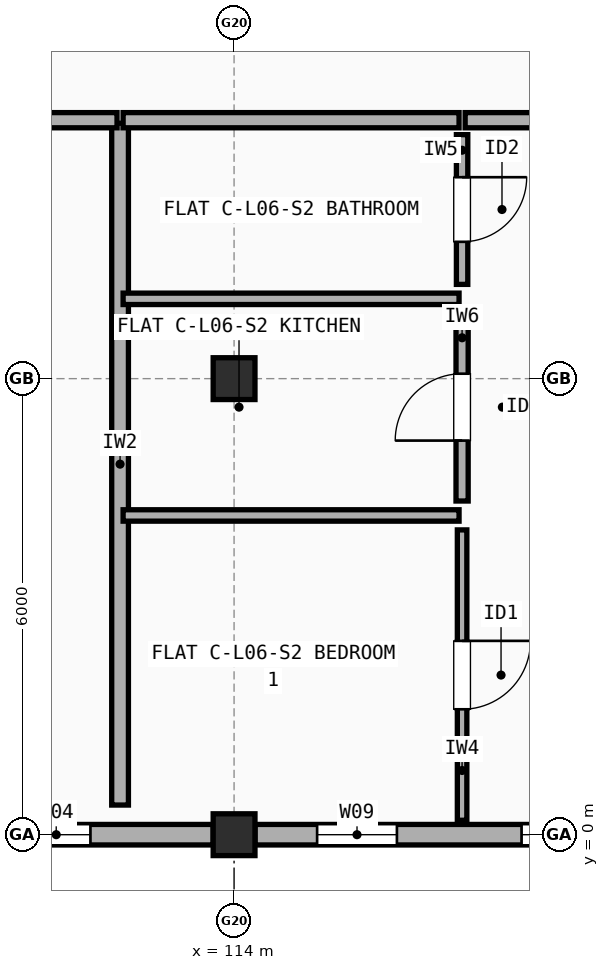
"""IFC4 building model, lengths in metres.
Left out: names, types, materials, properties, quantities, classifications, styles, units other than length and angle.
Written with IfcOpenShell. Run it as: python <this file> out.ifc"""

import sys

from ifc_helpers import new_model, si_unit, direction, frame, frame_2d, origin, origin_2d, place, context, subcontext, project, spatial, rectangle, extrude, element, fill, save


model = new_model("IFC4")
c1 = context("Model", 3, precision=1e-05, world=origin(), true_north=direction((0.0, 1.0)))
c2 = subcontext(c1, "Body", "Model", "MODEL_VIEW")
j1 = project(units=[si_unit("LENGTHUNIT", "METRE"), si_unit("PLANEANGLEUNIT", "RADIAN")], contexts=[c1])
p1 = place(None, origin())
s1 = spatial("IfcSite", under=j1, at=p1, CompositionType="ELEMENT")
p2 = place(p1, origin())
s2 = spatial("IfcBuilding", under=s1, at=p2, CompositionType="ELEMENT")
p3 = place(p2, frame((0.0, 0.0, 20.5)))
s3 = spatial("IfcBuildingStorey", under=s2, at=p3, CompositionType="ELEMENT", Elevation=20.5)
for number, where, z_axis, x_axis in (
    (1, (114.0, 0.0, 0.0), (0.0, 0.0, 1.0), (1.0, 0.0, 0.0)),
    (2, (114.0, 6.0, 0.0), (0.0, 0.0, 1.0), (1.0, 0.0, 0.0)),
):
    element("IfcColumn", number, at=place(p3, frame(where, z_axis=z_axis, x_axis=x_axis)), inside=s3, PredefinedType="COLUMN", context=c2, shape_type="SweptSolid", body=[
        extrude(rectangle(XDim=0.55, YDim=0.55, at=origin_2d()), origin(), (0.0, 0.0, 1.0), 2.97),
    ])
p4 = place(p3, frame((108.275, 0.0, 0.0), z_axis=(0.0, 0.0, 1.0), x_axis=(1.0, 0.0, 0.0)))
e3 = element("IfcWall", 3, at=p4, inside=s3, PredefinedType="STANDARD", context=c2, shape_type="SweptSolid", body=[
    extrude(rectangle(XDim=5.45, YDim=0.27, at=frame_2d((2.725, 0.0))), origin(), (0.0, 0.0, 1.0), 2.452),
])
p5 = place(p4, frame((0.35, 0.0, 0.9)))
e4 = element("IfcOpeningElement", 4, at=p5, cuts=e3, PredefinedType="OPENING", context=c2, shape_type="SweptSolid", body=[
    extrude(rectangle(XDim=0.9, YDim=1.3, at=frame_2d((0.45, 0.65))), frame((0.0, 0.145, 0.0), z_axis=(0.0, -1.0, 0.0), x_axis=(1.0, 0.0, 0.0)), (0.0, 0.0, 1.0), 0.29),
])
p6 = place(p4, frame((2.935, 0.0, 0.9)))
e5 = element("IfcOpeningElement", 5, at=p6, cuts=e3, PredefinedType="OPENING", context=c2, shape_type="SweptSolid", body=[
    extrude(rectangle(XDim=0.9, YDim=1.3, at=frame_2d((0.45, 0.65))), frame((0.0, 0.145, 0.0), z_axis=(0.0, -1.0, 0.0), x_axis=(1.0, 0.0, 0.0)), (0.0, 0.0, 1.0), 0.29),
])
p7 = place(p3, frame((114.275, 0.0, 0.0), z_axis=(0.0, 0.0, 1.0), x_axis=(1.0, 0.0, 0.0)))
e6 = element("IfcWall", 6, at=p7, inside=s3, PredefinedType="STANDARD", context=c2, shape_type="SweptSolid", body=[
    extrude(rectangle(XDim=5.45, YDim=0.27, at=frame_2d((2.725, 0.0))), origin(), (0.0, 0.0, 1.0), 2.452),
])
p8 = place(p7, frame((0.817, 0.0, 0.9)))
e7 = element("IfcOpeningElement", 7, at=p8, cuts=e6, PredefinedType="OPENING", context=c2, shape_type="SweptSolid", body=[
    extrude(rectangle(XDim=1.05, YDim=1.35, at=frame_2d((0.525, 0.675))), frame((0.0, 0.145, 0.0), z_axis=(0.0, -1.0, 0.0), x_axis=(1.0, 0.0, 0.0)), (0.0, 0.0, 1.0), 0.29),
])
p9 = place(p7, frame((3.508, 0.0, 0.9)))
e8 = element("IfcOpeningElement", 8, at=p9, cuts=e6, PredefinedType="OPENING", context=c2, shape_type="SweptSolid", body=[
    extrude(rectangle(XDim=1.2, YDim=1.35, at=frame_2d((0.6, 0.675))), frame((0.0, 0.145, 0.0), z_axis=(0.0, -1.0, 0.0), x_axis=(1.0, 0.0, 0.0)), (0.0, 0.0, 1.0), 0.29),
])
p10 = place(p3, frame((112.5, 0.39, 0.0), z_axis=(0.0, 0.0, 1.0), x_axis=(0.0, 1.0, 0.0)))
e9 = element("IfcWall", 9, at=p10, inside=s3, PredefinedType="SOLIDWALL", context=c2, shape_type="SweptSolid", body=[
    extrude(rectangle(XDim=8.97, YDim=0.22, at=frame_2d((4.485, 0.0))), origin(), (0.0, 0.0, 1.0), 2.452),
])
p11 = place(p3, frame((106.54, 9.4, 0.0), z_axis=(0.0, 0.0, 1.0), x_axis=(1.0, 0.0, 0.0)))
e10 = element("IfcWall", 10, at=p11, inside=s3, PredefinedType="SOLIDWALL", context=c2, shape_type="SweptSolid", body=[
    extrude(rectangle(XDim=5.92, YDim=0.2, at=frame_2d((2.96, 0.0))), origin(), (0.0, 0.0, 1.0), 2.548),
])
p12 = place(p11, frame((2.46, 0.0, 0.0)))
e11 = element("IfcOpeningElement", 11, at=p12, cuts=e10, PredefinedType="OPENING", context=c2, shape_type="SweptSolid", body=[
    extrude(rectangle(XDim=1.0, YDim=2.15, at=frame_2d((0.5, 1.075))), frame((0.0, 0.11, 0.0), z_axis=(0.0, -1.0, 0.0), x_axis=(1.0, 0.0, 0.0)), (0.0, 0.0, 1.0), 0.22),
])
p13 = place(p3, frame((112.54, 9.4, 0.0), z_axis=(0.0, 0.0, 1.0), x_axis=(1.0, 0.0, 0.0)))
e12 = element("IfcWall", 12, at=p13, inside=s3, PredefinedType="SOLIDWALL", context=c2, shape_type="SweptSolid", body=[
    extrude(rectangle(XDim=4.42, YDim=0.2, at=frame_2d((2.21, 0.0))), origin(), (0.0, 0.0, 1.0), 2.548),
])
p14 = place(p3, frame((117.04, 9.4, 0.0), z_axis=(0.0, 0.0, 1.0), x_axis=(1.0, 0.0, 0.0)))
e13 = element("IfcWall", 13, at=p14, inside=s3, PredefinedType="SOLIDWALL", context=c2, shape_type="SweptSolid", body=[
    extrude(rectangle(XDim=5.92, YDim=0.2, at=frame_2d((2.96, 0.0))), origin(), (0.0, 0.0, 1.0), 2.508),
])
p15 = place(p14, frame((2.47, 0.0, 0.0)))
e14 = element("IfcOpeningElement", 14, at=p15, cuts=e13, PredefinedType="OPENING", context=c2, shape_type="SweptSolid", body=[
    extrude(rectangle(XDim=0.98, YDim=2.15, at=frame_2d((0.49, 1.075))), frame((0.0, 0.11, 0.0), z_axis=(0.0, -1.0, 0.0), x_axis=(1.0, 0.0, 0.0)), (0.0, 0.0, 1.0), 0.22),
])
p16 = place(p3, frame((117.0, 0.19, 0.0), z_axis=(0.0, 0.0, 1.0), x_axis=(0.0, 1.0, 0.0)))
e15 = element("IfcWall", 15, at=p16, inside=s3, PredefinedType="PARTITIONING", context=c2, shape_type="SweptSolid", body=[
    extrude(rectangle(XDim=3.82, YDim=0.125, at=frame_2d((1.91, 0.0))), origin(), (0.0, 0.0, 1.0), 2.97),
])
p17 = place(p16, frame((1.46, 0.0, 0.0)))
e16 = element("IfcOpeningElement", 16, at=p17, cuts=e15, PredefinedType="OPENING", context=c2, shape_type="SweptSolid", body=[
    extrude(rectangle(XDim=0.9, YDim=2.1, at=frame_2d((0.45, 1.05))), frame((0.0, 0.073, 0.0), z_axis=(0.0, -1.0, 0.0), x_axis=(1.0, 0.0, 0.0)), (0.0, 0.0, 1.0), 0.145),
])
p18 = place(p3, frame((117.0, 4.39, 0.0), z_axis=(0.0, 0.0, 1.0), x_axis=(0.0, 1.0, 0.0)))
e17 = element("IfcWall", 17, at=p18, inside=s3, PredefinedType="PLUMBINGWALL", context=c2, shape_type="SweptSolid", body=[
    extrude(rectangle(XDim=2.47, YDim=0.16, at=frame_2d((1.235, 0.0))), origin(), (0.0, 0.0, 1.0), 2.452),
])
p19 = place(p18, frame((0.795, 0.0, 0.0)))
e18 = element("IfcOpeningElement", 18, at=p19, cuts=e17, PredefinedType="OPENING", context=c2, shape_type="SweptSolid", body=[
    extrude(rectangle(XDim=0.88, YDim=2.1, at=frame_2d((0.44, 1.05))), frame((0.0, 0.09, 0.0), z_axis=(0.0, -1.0, 0.0), x_axis=(1.0, 0.0, 0.0)), (0.0, 0.0, 1.0), 0.18),
])
p20 = place(p3, frame((117.0, 7.24, 0.0), z_axis=(0.0, 0.0, 1.0), x_axis=(0.0, 1.0, 0.0)))
e19 = element("IfcWall", 19, at=p20, inside=s3, PredefinedType="PARTITIONING", context=c2, shape_type="SweptSolid", body=[
    extrude(rectangle(XDim=1.97, YDim=0.15, at=frame_2d((0.985, 0.0))), origin(), (0.0, 0.0, 1.0), 2.97),
])
p21 = place(p20, frame((0.56, 0.0, 0.0)))
e20 = element("IfcOpeningElement", 20, at=p21, cuts=e19, PredefinedType="OPENING", context=c2, shape_type="SweptSolid", body=[
    extrude(rectangle(XDim=0.85, YDim=2.1, at=frame_2d((0.425, 1.05))), frame((0.0, 0.085, 0.0), z_axis=(0.0, -1.0, 0.0), x_axis=(1.0, 0.0, 0.0)), (0.0, 0.0, 1.0), 0.17),
])
p22 = place(p3, frame((112.54, 4.2, 0.0), z_axis=(0.0, 0.0, 1.0), x_axis=(1.0, 0.0, 0.0)))
e21 = element("IfcWall", 21, at=p22, inside=s3, PredefinedType="PARTITIONING", context=c2, shape_type="SweptSolid", body=[
    extrude(rectangle(XDim=4.42, YDim=0.15, at=frame_2d((2.21, 0.0))), origin(), (0.0, 0.0, 1.0), 2.458),
])
p23 = place(p3, frame((112.54, 7.05, 0.0), z_axis=(0.0, 0.0, 1.0), x_axis=(1.0, 0.0, 0.0)))
e22 = element("IfcWall", 22, at=p23, inside=s3, PredefinedType="PARTITIONING", context=c2, shape_type="SweptSolid", body=[
    extrude(rectangle(XDim=4.42, YDim=0.15, at=frame_2d((2.21, 0.0))), origin(), (0.0, 0.0, 1.0), 2.548),
])
p24 = place(p6, origin())
e23 = element("IfcWindow", 23, at=p24, inside=s3, PartitioningType="SINGLE_PANEL", PredefinedType="WINDOW", context=c2, shape_type="SweptSolid", body=[
    extrude(rectangle(XDim=0.9, YDim=1.3, at=frame_2d((0.45, 0.65))), frame((0.0, 0.03, 0.0), z_axis=(0.0, -1.0, 0.0), x_axis=(1.0, 0.0, 0.0)), (0.0, 0.0, 1.0), 0.06),
])
fill(e5, e23)
p25 = place(p8, origin())
e24 = element("IfcWindow", 24, at=p25, inside=s3, PartitioningType="SINGLE_PANEL", PredefinedType="WINDOW", context=c2, shape_type="SweptSolid", body=[
    extrude(rectangle(XDim=1.05, YDim=1.35, at=frame_2d((0.525, 0.675))), frame((0.0, 0.03, 0.0), z_axis=(0.0, -1.0, 0.0), x_axis=(1.0, 0.0, 0.0)), (0.0, 0.0, 1.0), 0.06),
])
fill(e7, e24)
p26 = place(p9, origin())
e25 = element("IfcWindow", 25, at=p26, inside=s3, PartitioningType="SINGLE_PANEL", PredefinedType="WINDOW", context=c2, shape_type="SweptSolid", body=[
    extrude(rectangle(XDim=1.2, YDim=1.35, at=frame_2d((0.6, 0.675))), frame((0.0, 0.03, 0.0), z_axis=(0.0, -1.0, 0.0), x_axis=(1.0, 0.0, 0.0)), (0.0, 0.0, 1.0), 0.06),
])
fill(e8, e25)
p27 = place(p17, origin())
e26 = element("IfcDoor", 26, at=p27, inside=s3, OperationType="SINGLE_SWING_RIGHT", PredefinedType="DOOR", context=c2, shape_type="SweptSolid", body=[
    extrude(rectangle(XDim=0.9, YDim=2.1, at=frame_2d((0.45, 1.05))), frame((0.0, 0.025, 0.0), z_axis=(0.0, -1.0, 0.0), x_axis=(1.0, 0.0, 0.0)), (0.0, 0.0, 1.0), 0.05),
])
fill(e16, e26)
p28 = place(p19, origin())
e27 = element("IfcDoor", 27, at=p28, inside=s3, OperationType="SINGLE_SWING_LEFT", PredefinedType="DOOR", context=c2, shape_type="SweptSolid", body=[
    extrude(rectangle(XDim=0.88, YDim=2.1, at=frame_2d((0.44, 1.05))), frame((0.0, 0.025, 0.0), z_axis=(0.0, -1.0, 0.0), x_axis=(1.0, 0.0, 0.0)), (0.0, 0.0, 1.0), 0.05),
])
fill(e18, e27)
p29 = place(p21, origin())
e28 = element("IfcDoor", 28, at=p29, inside=s3, OperationType="SINGLE_SWING_RIGHT", PredefinedType="DOOR", context=c2, shape_type="SweptSolid", body=[
    extrude(rectangle(XDim=0.85, YDim=2.1, at=frame_2d((0.425, 1.05))), frame((0.0, 0.025, 0.0), z_axis=(0.0, -1.0, 0.0), x_axis=(1.0, 0.0, 0.0)), (0.0, 0.0, 1.0), 0.05),
])
fill(e20, e28)
save(model, sys.argv[1])
